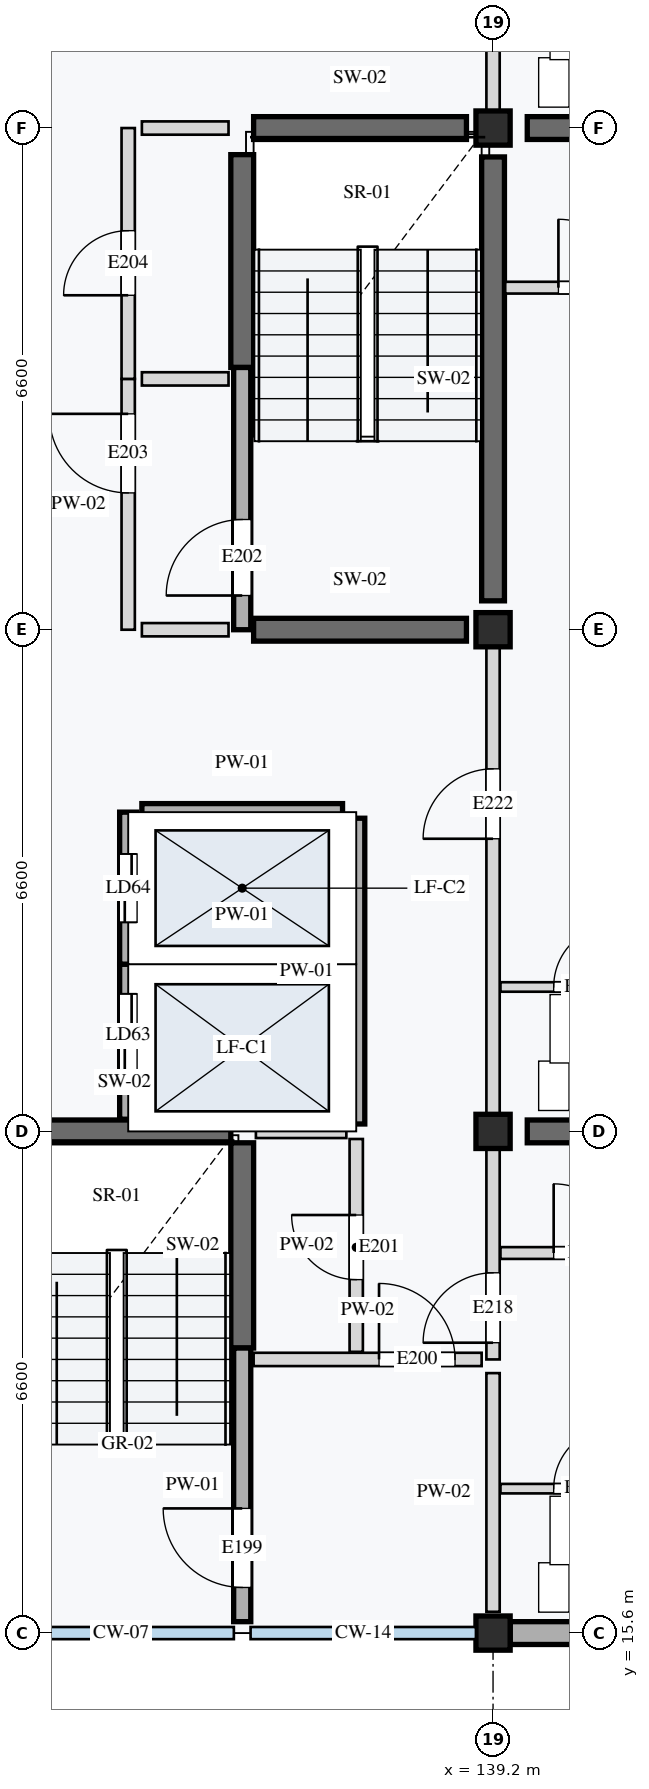
"""IFC4 building model, lengths in metres.
Left out: names, types, materials, properties, quantities, classifications, styles, units other than length and angle.
Written with IfcOpenShell. Run it as: python <this file> out.ifc"""

import sys

from ifc_helpers import new_model, si_unit, direction, frame, frame_2d, origin, origin_2d, place, context, subcontext, project, spatial, rectangle, extrude, element, fill, save


model = new_model("IFC4")
c1 = context("Model", 3, precision=1e-05, world=origin(), true_north=direction((0.0, 1.0)))
c2 = subcontext(c1, "Body", "Model", "MODEL_VIEW")
j1 = project(units=[si_unit("LENGTHUNIT", "METRE"), si_unit("PLANEANGLEUNIT", "RADIAN")], contexts=[c1])
p1 = place(None, origin())
s1 = spatial("IfcSite", under=j1, at=p1, CompositionType="ELEMENT")
p2 = place(p1, origin())
s2 = spatial("IfcBuilding", under=s1, at=p2, CompositionType="ELEMENT")
p3 = place(p2, frame((0.0, 0.0, 14.8)))
s3 = spatial("IfcBuildingStorey", under=s2, at=p3, CompositionType="ELEMENT", Elevation=14.8)
for number, where, z_axis, x_axis in (
    (1, (139.2, 15.6, 0.0), (0.0, 0.0, 1.0), (1.0, 0.0, 0.0)),
    (2, (139.2, 22.2, 0.0), (0.0, 0.0, 1.0), (1.0, 0.0, 0.0)),
    (3, (139.2, 28.8, 0.0), (0.0, 0.0, 1.0), (1.0, 0.0, 0.0)),
    (4, (139.2, 35.4, 0.0), (0.0, 0.0, 1.0), (1.0, 0.0, 0.0)),
):
    element("IfcColumn", number, at=place(p3, frame(where, z_axis=z_axis, x_axis=x_axis)), inside=s3, PredefinedType="COLUMN", context=c2, shape_type="SweptSolid", body=[
        extrude(rectangle(XDim=0.45, YDim=0.45, at=origin_2d()), origin(), (0.0, 0.0, 1.0), 3.2),
    ])
p4 = place(p3, frame((135.9, 19.35, 0.0), z_axis=(0.0, 0.0, 1.0), x_axis=(0.0, 1.0, 0.0)))
e5 = element("IfcWall", 5, at=p4, inside=s3, PredefinedType="SHEAR", context=c2, shape_type="SweptSolid", body=[
    extrude(rectangle(XDim=2.7, YDim=0.3, at=frame_2d((1.35, 0.0))), origin(), (0.0, 0.0, 1.0), 2.96),
])
p5 = place(p3, frame((132.95, 22.2, 0.0), z_axis=(0.0, 0.0, 1.0), x_axis=(1.0, 0.0, 0.0)))
e6 = element("IfcWall", 6, at=p5, inside=s3, PredefinedType="SHEAR", context=c2, shape_type="SweptSolid", body=[
    extrude(rectangle(XDim=2.8, YDim=0.3, at=frame_2d((1.4, 0.0))), origin(), (0.0, 0.0, 1.0), 2.96),
])
p6 = place(p3, frame((139.2, 29.18, 0.0), z_axis=(0.0, 0.0, 1.0), x_axis=(0.0, 1.0, 0.0)))
e7 = element("IfcWall", 7, at=p6, inside=s3, PredefinedType="SHEAR", context=c2, shape_type="SweptSolid", body=[
    extrude(rectangle(XDim=5.84, YDim=0.3, at=frame_2d((2.92, 0.0))), origin(), (0.0, 0.0, 1.0), 2.96),
])
for number, where, z_axis, x_axis in (
    (8, (135.9, 32.25, 0.0), (0.0, 0.0, 1.0), (0.0, 1.0, 0.0)),
    (9, (136.05, 28.8, 0.0), (0.0, 0.0, 1.0), (1.0, 0.0, 0.0)),
    (10, (136.05, 35.4, 0.0), (0.0, 0.0, 1.0), (1.0, 0.0, 0.0)),
):
    element("IfcWall", number, at=place(p3, frame(where, z_axis=z_axis, x_axis=x_axis)), inside=s3, PredefinedType="SHEAR", context=c2, shape_type="SweptSolid", body=[
        extrude(rectangle(XDim=2.8, YDim=0.3, at=frame_2d((1.4, 0.0))), origin(), (0.0, 0.0, 1.0), 2.96),
    ])
for number, where, z_axis, x_axis in (
    (11, (139.65, 22.2, 0.0), (0.0, 0.0, 1.0), (1.0, 0.0, 0.0)),
    (12, (139.65, 35.4, 0.0), (0.0, 0.0, 1.0), (1.0, 0.0, 0.0)),
):
    element("IfcWall", number, at=place(p3, frame(where, z_axis=z_axis, x_axis=x_axis)), inside=s3, PredefinedType="SHEAR", context=c2, shape_type="SweptSolid", body=[
        extrude(rectangle(XDim=5.7, YDim=0.3, at=frame_2d((2.85, 0.0))), origin(), (0.0, 0.0, 1.0), 2.96),
    ])
p7 = place(p3, frame((139.425, 15.6, 0.0), z_axis=(0.0, 0.0, 1.0), x_axis=(1.0, 0.0, 0.0)))
e13 = element("IfcWall", 13, at=p7, inside=s3, PredefinedType="STANDARD", context=c2, shape_type="SweptSolid", body=[
    extrude(rectangle(XDim=6.15, YDim=0.3, at=frame_2d((3.075, 0.0))), origin(), (0.0, 0.0, 1.0), 2.65),
])
p8 = place(p3, frame((135.9, 15.75, 0.0), z_axis=(0.0, 0.0, 1.0), x_axis=(0.0, 1.0, 0.0)))
e14 = element("IfcWall", 14, at=p8, inside=s3, PredefinedType="STANDARD", context=c2, shape_type="SweptSolid", body=[
    extrude(rectangle(XDim=3.6, YDim=0.225, at=frame_2d((1.8, 0.0))), origin(), (0.0, 0.0, 1.0), 2.96),
])
p9 = place(p8, frame((0.45, 0.0, 0.0)))
e15 = element("IfcOpeningElement", 15, at=p9, cuts=e14, PredefinedType="OPENING", context=c2, shape_type="SweptSolid", body=[
    extrude(rectangle(XDim=1.04, YDim=2.12, at=frame_2d((0.52, 1.06))), frame((0.0, 0.123, 0.0), z_axis=(0.0, -1.0, 0.0), x_axis=(1.0, 0.0, 0.0)), (0.0, 0.0, 1.0), 0.245),
])
p10 = place(p3, frame((136.05, 19.2, 0.0), z_axis=(0.0, 0.0, 1.0), x_axis=(1.0, 0.0, 0.0)))
e16 = element("IfcWall", 16, at=p10, inside=s3, PredefinedType="PARTITIONING", context=c2, shape_type="SweptSolid", body=[
    extrude(rectangle(XDim=3.0, YDim=0.175, at=frame_2d((1.5, 0.0))), origin(), (0.0, 0.0, 1.0), 2.96),
])
p11 = place(p10, frame((1.65, 0.0, 0.0)))
e17 = element("IfcOpeningElement", 17, at=p11, cuts=e16, PredefinedType="OPENING", context=c2, shape_type="SweptSolid", body=[
    extrude(rectangle(XDim=1.0, YDim=2.1, at=frame_2d((0.5, 1.05))), frame((0.0, 0.097, 0.0), z_axis=(0.0, -1.0, 0.0), x_axis=(1.0, 0.0, 0.0)), (0.0, 0.0, 1.0), 0.195),
])
p12 = place(p3, frame((137.4, 19.3, 0.0), z_axis=(0.0, 0.0, 1.0), x_axis=(0.0, 1.0, 0.0)))
e18 = element("IfcWall", 18, at=p12, inside=s3, PredefinedType="PARTITIONING", context=c2, shape_type="SweptSolid", body=[
    extrude(rectangle(XDim=2.8, YDim=0.175, at=frame_2d((1.4, 0.0))), origin(), (0.0, 0.0, 1.0), 2.96),
])
p13 = place(p12, frame((0.95, 0.0, 0.0)))
e19 = element("IfcOpeningElement", 19, at=p13, cuts=e18, PredefinedType="OPENING", context=c2, shape_type="SweptSolid", body=[
    extrude(rectangle(XDim=0.85, YDim=2.0, at=frame_2d((0.425, 1.0))), frame((0.0, 0.097, 0.0), z_axis=(0.0, -1.0, 0.0), x_axis=(1.0, 0.0, 0.0)), (0.0, 0.0, 1.0), 0.195),
])
p14 = place(p3, frame((136.08, 22.2, 0.0), z_axis=(0.0, 0.0, 1.0), x_axis=(1.0, 0.0, 0.0)))
e20 = element("IfcWall", 20, at=p14, inside=s3, PredefinedType="PARTITIONING", context=c2, shape_type="SweptSolid", body=[
    extrude(rectangle(XDim=1.19, YDim=0.175, at=frame_2d((0.595, 0.0))), origin(), (0.0, 0.0, 1.0), 2.96),
])
p15 = place(p3, frame((134.4, 22.36, 0.0), z_axis=(0.0, 0.0, 1.0), x_axis=(0.0, 1.0, 0.0)))
e21 = element("IfcWall", 21, at=p15, inside=s3, PredefinedType="STANDARD", context=c2, shape_type="SweptSolid", body=[
    extrude(rectangle(XDim=2.04, YDim=0.225, at=frame_2d((1.02, 0.0))), origin(), (0.0, 0.0, 1.0), 2.96),
])
p16 = place(p15, frame((0.55, 0.0, 0.0)))
e22 = element("IfcOpeningElement", 22, at=p16, cuts=e21, PredefinedType="OPENING", context=c2, shape_type="SweptSolid", body=[
    extrude(rectangle(XDim=1.1, YDim=2.1, at=frame_2d((0.55, 1.05))), frame((0.0, 0.123, 0.0), z_axis=(0.0, -1.0, 0.0), x_axis=(1.0, 0.0, 0.0)), (0.0, 0.0, 1.0), 0.245),
])
p17 = place(p3, frame((134.4, 24.4, 0.0), z_axis=(0.0, 0.0, 1.0), x_axis=(0.0, 1.0, 0.0)))
e23 = element("IfcWall", 23, at=p17, inside=s3, PredefinedType="STANDARD", context=c2, shape_type="SweptSolid", body=[
    extrude(rectangle(XDim=2.0, YDim=0.225, at=frame_2d((1.0, 0.0))), origin(), (0.0, 0.0, 1.0), 2.96),
])
p18 = place(p17, frame((0.55, 0.0, 0.0)))
e24 = element("IfcOpeningElement", 24, at=p18, cuts=e23, PredefinedType="OPENING", context=c2, shape_type="SweptSolid", body=[
    extrude(rectangle(XDim=0.9, YDim=2.1, at=frame_2d((0.45, 1.05))), frame((0.0, 0.123, 0.0), z_axis=(0.0, -1.0, 0.0), x_axis=(1.0, 0.0, 0.0)), (0.0, 0.0, 1.0), 0.245),
])
p19 = place(p3, frame((137.4, 22.298, 0.0), z_axis=(0.0, 0.0, 1.0), x_axis=(0.0, 1.0, 0.0)))
e25 = element("IfcWall", 25, at=p19, inside=s3, PredefinedType="STANDARD", context=c2, shape_type="SweptSolid", body=[
    extrude(rectangle(XDim=4.022, YDim=0.225, at=frame_2d((2.011, 0.0))), origin(), (0.0, 0.0, 1.0), 2.96),
])
for number, where, z_axis, x_axis in (
    (26, (134.58, 24.4, 0.0), (0.0, 0.0, 1.0), (1.0, 0.0, 0.0)),
    (27, (134.58, 26.4, 0.0), (0.0, 0.0, 1.0), (1.0, 0.0, 0.0)),
):
    element("IfcWall", number, at=place(p3, frame(where, z_axis=z_axis, x_axis=x_axis)), inside=s3, PredefinedType="STANDARD", context=c2, shape_type="SweptSolid", body=[
        extrude(rectangle(XDim=2.64, YDim=0.225, at=frame_2d((1.32, 0.0))), origin(), (0.0, 0.0, 1.0), 2.96),
    ])
p20 = place(p3, frame((135.9, 28.8, 0.0), z_axis=(0.0, 0.0, 1.0), x_axis=(0.0, 1.0, 0.0)))
e28 = element("IfcWall", 28, at=p20, inside=s3, PredefinedType="STANDARD", context=c2, shape_type="SweptSolid", body=[
    extrude(rectangle(XDim=3.45, YDim=0.225, at=frame_2d((1.725, 0.0))), origin(), (0.0, 0.0, 1.0), 2.96),
])
p21 = place(p20, frame((0.45, 0.0, 0.0)))
e29 = element("IfcOpeningElement", 29, at=p21, cuts=e28, PredefinedType="OPENING", context=c2, shape_type="SweptSolid", body=[
    extrude(rectangle(XDim=1.0, YDim=2.16, at=frame_2d((0.5, 1.08))), frame((0.0, 0.123, 0.0), z_axis=(0.0, -1.0, 0.0), x_axis=(1.0, 0.0, 0.0)), (0.0, 0.0, 1.0), 0.245),
])
p22 = place(p3, frame((134.4, 28.8, 0.0), z_axis=(0.0, 0.0, 1.0), x_axis=(0.0, 1.0, 0.0)))
e30 = element("IfcWall", 30, at=p22, inside=s3, PredefinedType="PARTITIONING", context=c2, shape_type="SweptSolid", body=[
    extrude(rectangle(XDim=3.3, YDim=0.175, at=frame_2d((1.65, 0.0))), origin(), (0.0, 0.0, 1.0), 2.96),
])
p23 = place(p22, frame((1.8, 0.0, 0.0)))
e31 = element("IfcOpeningElement", 31, at=p23, cuts=e30, PredefinedType="OPENING", context=c2, shape_type="SweptSolid", body=[
    extrude(rectangle(XDim=1.04, YDim=2.12, at=frame_2d((0.52, 1.06))), frame((0.0, 0.097, 0.0), z_axis=(0.0, -1.0, 0.0), x_axis=(1.0, 0.0, 0.0)), (0.0, 0.0, 1.0), 0.195),
])
p24 = place(p3, frame((134.4, 32.1, 0.0), z_axis=(0.0, 0.0, 1.0), x_axis=(0.0, 1.0, 0.0)))
e32 = element("IfcWall", 32, at=p24, inside=s3, PredefinedType="PARTITIONING", context=c2, shape_type="SweptSolid", body=[
    extrude(rectangle(XDim=3.3, YDim=0.175, at=frame_2d((1.65, 0.0))), origin(), (0.0, 0.0, 1.0), 2.96),
])
p25 = place(p24, frame((1.1, 0.0, 0.0)))
e33 = element("IfcOpeningElement", 33, at=p25, cuts=e32, PredefinedType="OPENING", context=c2, shape_type="SweptSolid", body=[
    extrude(rectangle(XDim=0.85, YDim=2.0, at=frame_2d((0.425, 1.0))), frame((0.0, 0.097, 0.0), z_axis=(0.0, -1.0, 0.0), x_axis=(1.0, 0.0, 0.0)), (0.0, 0.0, 1.0), 0.195),
])
for number, where, z_axis, x_axis in (
    (34, (134.58, 28.8, 0.0), (0.0, 0.0, 1.0), (1.0, 0.0, 0.0)),
    (35, (134.58, 32.1, 0.0), (0.0, 0.0, 1.0), (1.0, 0.0, 0.0)),
    (36, (134.58, 35.4, 0.0), (0.0, 0.0, 1.0), (1.0, 0.0, 0.0)),
):
    element("IfcWall", number, at=place(p3, frame(where, z_axis=z_axis, x_axis=x_axis)), inside=s3, PredefinedType="PARTITIONING", context=c2, shape_type="SweptSolid", body=[
        extrude(rectangle(XDim=1.14, YDim=0.175, at=frame_2d((0.57, 0.0))), origin(), (0.0, 0.0, 1.0), 2.96),
    ])
p26 = place(p3, frame((139.2, 15.88, 0.0), z_axis=(0.0, 0.0, 1.0), x_axis=(0.0, 1.0, 0.0)))
e37 = element("IfcWall", 37, at=p26, inside=s3, PredefinedType="PARTITIONING", context=c2, shape_type="SweptSolid", body=[
    extrude(rectangle(XDim=3.14, YDim=0.175, at=frame_2d((1.57, 0.0))), origin(), (0.0, 0.0, 1.0), 2.7),
])
p27 = place(p3, frame((139.2, 19.2, 0.0), z_axis=(0.0, 0.0, 1.0), x_axis=(0.0, 1.0, 0.0)))
e38 = element("IfcWall", 38, at=p27, inside=s3, PredefinedType="PARTITIONING", context=c2, shape_type="SweptSolid", body=[
    extrude(rectangle(XDim=3.0, YDim=0.175, at=frame_2d((1.5, 0.0))), origin(), (0.0, 0.0, 1.0), 2.7),
])
p28 = place(p27, frame((0.22, 0.0, 0.0)))
e39 = element("IfcOpeningElement", 39, at=p28, cuts=e38, PredefinedType="OPENING", context=c2, shape_type="SweptSolid", body=[
    extrude(rectangle(XDim=0.92, YDim=2.14, at=frame_2d((0.46, 1.07))), frame((0.0, 0.097, 0.0), z_axis=(0.0, -1.0, 0.0), x_axis=(1.0, 0.0, 0.0)), (0.0, 0.0, 1.0), 0.195),
])
p29 = place(p3, frame((139.298, 17.5, 0.0), z_axis=(0.0, 0.0, 1.0), x_axis=(1.0, 0.0, 0.0)))
e40 = element("IfcWall", 40, at=p29, inside=s3, PredefinedType="PARTITIONING", context=c2, shape_type="SweptSolid", body=[
    extrude(rectangle(XDim=2.302, YDim=0.125, at=frame_2d((1.151, 0.0))), origin(), (0.0, 0.0, 1.0), 2.96),
])
p30 = place(p29, frame((0.7, 0.0, 0.0)))
e41 = element("IfcOpeningElement", 41, at=p30, cuts=e40, PredefinedType="OPENING", context=c2, shape_type="SweptSolid", body=[
    extrude(rectangle(XDim=0.82, YDim=2.05, at=frame_2d((0.41, 1.025))), frame((0.0, 0.073, 0.0), z_axis=(0.0, -1.0, 0.0), x_axis=(1.0, 0.0, 0.0)), (0.0, 0.0, 1.0), 0.145),
])
p31 = place(p3, frame((139.298, 20.6, 0.0), z_axis=(0.0, 0.0, 1.0), x_axis=(1.0, 0.0, 0.0)))
e42 = element("IfcWall", 42, at=p31, inside=s3, PredefinedType="PARTITIONING", context=c2, shape_type="SweptSolid", body=[
    extrude(rectangle(XDim=2.302, YDim=0.155, at=frame_2d((1.151, 0.0))), origin(), (0.0, 0.0, 1.0), 2.96),
])
p32 = place(p31, frame((0.7, 0.0, 0.0)))
e43 = element("IfcOpeningElement", 43, at=p32, cuts=e42, PredefinedType="OPENING", context=c2, shape_type="SweptSolid", body=[
    extrude(rectangle(XDim=0.91, YDim=2.14, at=frame_2d((0.455, 1.07))), frame((0.0, 0.087, 0.0), z_axis=(0.0, -1.0, 0.0), x_axis=(1.0, 0.0, 0.0)), (0.0, 0.0, 1.0), 0.175),
])
p33 = place(p3, frame((139.2, 22.2, 0.0), z_axis=(0.0, 0.0, 1.0), x_axis=(0.0, 1.0, 0.0)))
e44 = element("IfcWall", 44, at=p33, inside=s3, PredefinedType="PARTITIONING", context=c2, shape_type="SweptSolid", body=[
    extrude(rectangle(XDim=6.6, YDim=0.175, at=frame_2d((3.3, 0.0))), origin(), (0.0, 0.0, 1.0), 2.7),
])
p34 = place(p33, frame((3.85, 0.0, 0.0)))
e45 = element("IfcOpeningElement", 45, at=p34, cuts=e44, PredefinedType="OPENING", context=c2, shape_type="SweptSolid", body=[
    extrude(rectangle(XDim=0.92, YDim=2.14, at=frame_2d((0.46, 1.07))), frame((0.0, 0.097, 0.0), z_axis=(0.0, -1.0, 0.0), x_axis=(1.0, 0.0, 0.0)), (0.0, 0.0, 1.0), 0.195),
])
p35 = place(p3, frame((139.298, 24.1, 0.0), z_axis=(0.0, 0.0, 1.0), x_axis=(1.0, 0.0, 0.0)))
e46 = element("IfcWall", 46, at=p35, inside=s3, PredefinedType="PARTITIONING", context=c2, shape_type="SweptSolid", body=[
    extrude(rectangle(XDim=2.302, YDim=0.125, at=frame_2d((1.151, 0.0))), origin(), (0.0, 0.0, 1.0), 2.96),
])
p36 = place(p35, frame((0.7, 0.0, 0.0)))
e47 = element("IfcOpeningElement", 47, at=p36, cuts=e46, PredefinedType="OPENING", context=c2, shape_type="SweptSolid", body=[
    extrude(rectangle(XDim=0.82, YDim=2.05, at=frame_2d((0.41, 1.025))), frame((0.0, 0.073, 0.0), z_axis=(0.0, -1.0, 0.0), x_axis=(1.0, 0.0, 0.0)), (0.0, 0.0, 1.0), 0.145),
])
p37 = place(p3, frame((139.36, 33.3, 0.0), z_axis=(0.0, 0.0, 1.0), x_axis=(1.0, 0.0, 0.0)))
e48 = element("IfcWall", 48, at=p37, inside=s3, PredefinedType="PARTITIONING", context=c2, shape_type="SweptSolid", body=[
    extrude(rectangle(XDim=2.24, YDim=0.155, at=frame_2d((1.12, 0.0))), origin(), (0.0, 0.0, 1.0), 2.96),
])
p38 = place(p37, frame((0.7, 0.0, 0.0)))
e49 = element("IfcOpeningElement", 49, at=p38, cuts=e48, PredefinedType="OPENING", context=c2, shape_type="SweptSolid", body=[
    extrude(rectangle(XDim=0.9, YDim=2.16, at=frame_2d((0.45, 1.08))), frame((0.0, 0.087, 0.0), z_axis=(0.0, -1.0, 0.0), x_axis=(1.0, 0.0, 0.0)), (0.0, 0.0, 1.0), 0.175),
])
p39 = place(p3, frame((139.2, 35.4, 0.0), z_axis=(0.0, 0.0, 1.0), x_axis=(0.0, 1.0, 0.0)))
e50 = element("IfcWall", 50, at=p39, inside=s3, PredefinedType="PARTITIONING", context=c2, shape_type="SweptSolid", body=[
    extrude(rectangle(XDim=6.6, YDim=0.175, at=frame_2d((3.3, 0.0))), origin(), (0.0, 0.0, 1.0), 2.7),
])
p40 = place(p39, frame((2.725, 0.0, 0.0)))
e51 = element("IfcOpeningElement", 51, at=p40, cuts=e50, PredefinedType="OPENING", context=c2, shape_type="SweptSolid", body=[
    extrude(rectangle(XDim=0.95, YDim=2.1, at=frame_2d((0.475, 1.05))), frame((0.0, 0.097, 0.0), z_axis=(0.0, -1.0, 0.0), x_axis=(1.0, 0.0, 0.0)), (0.0, 0.0, 1.0), 0.195),
])
p41 = place(p9, origin())
e52 = element("IfcDoor", 52, at=p41, inside=s3, OperationType="SINGLE_SWING_RIGHT", PredefinedType="DOOR", context=c2, shape_type="SweptSolid", body=[
    extrude(rectangle(XDim=1.04, YDim=2.12, at=frame_2d((0.52, 1.06))), frame((0.0, 0.025, 0.0), z_axis=(0.0, -1.0, 0.0), x_axis=(1.0, 0.0, 0.0)), (0.0, 0.0, 1.0), 0.05),
])
fill(e15, e52)
p42 = place(p11, origin())
e53 = element("IfcDoor", 53, at=p42, inside=s3, OperationType="SINGLE_SWING_LEFT", PredefinedType="DOOR", context=c2, shape_type="SweptSolid", body=[
    extrude(rectangle(XDim=1.0, YDim=2.1, at=frame_2d((0.5, 1.05))), frame((0.0, 0.025, 0.0), z_axis=(0.0, -1.0, 0.0), x_axis=(1.0, 0.0, 0.0)), (0.0, 0.0, 1.0), 0.05),
])
fill(e17, e53)
p43 = place(p13, origin())
e54 = element("IfcDoor", 54, at=p43, inside=s3, OperationType="SINGLE_SWING_RIGHT", PredefinedType="DOOR", context=c2, shape_type="SweptSolid", body=[
    extrude(rectangle(XDim=0.85, YDim=2.0, at=frame_2d((0.425, 1.0))), frame((0.0, 0.025, 0.0), z_axis=(0.0, -1.0, 0.0), x_axis=(1.0, 0.0, 0.0)), (0.0, 0.0, 1.0), 0.05),
])
fill(e19, e54)
p44 = place(p16, origin())
e55 = element("IfcDoor", 55, at=p44, inside=s3, OperationType="DOUBLE_DOOR_SLIDING", PredefinedType="DOOR", context=c2, shape_type="SweptSolid", body=[
    extrude(rectangle(XDim=1.1, YDim=2.1, at=frame_2d((0.55, 1.05))), frame((0.0, 0.025, 0.0), z_axis=(0.0, -1.0, 0.0), x_axis=(1.0, 0.0, 0.0)), (0.0, 0.0, 1.0), 0.05),
])
fill(e22, e55)
p45 = place(p18, origin())
e56 = element("IfcDoor", 56, at=p45, inside=s3, OperationType="DOUBLE_DOOR_SLIDING", PredefinedType="DOOR", context=c2, shape_type="SweptSolid", body=[
    extrude(rectangle(XDim=0.9, YDim=2.1, at=frame_2d((0.45, 1.05))), frame((0.0, 0.025, 0.0), z_axis=(0.0, -1.0, 0.0), x_axis=(1.0, 0.0, 0.0)), (0.0, 0.0, 1.0), 0.05),
])
fill(e24, e56)
p46 = place(p21, origin())
e57 = element("IfcDoor", 57, at=p46, inside=s3, OperationType="SINGLE_SWING_LEFT", PredefinedType="DOOR", context=c2, shape_type="SweptSolid", body=[
    extrude(rectangle(XDim=1.0, YDim=2.16, at=frame_2d((0.5, 1.08))), frame((0.0, 0.025, 0.0), z_axis=(0.0, -1.0, 0.0), x_axis=(1.0, 0.0, 0.0)), (0.0, 0.0, 1.0), 0.05),
])
fill(e29, e57)
p47 = place(p23, origin())
e58 = element("IfcDoor", 58, at=p47, inside=s3, OperationType="SINGLE_SWING_RIGHT", PredefinedType="DOOR", context=c2, shape_type="SweptSolid", body=[
    extrude(rectangle(XDim=1.04, YDim=2.12, at=frame_2d((0.52, 1.06))), frame((0.0, 0.025, 0.0), z_axis=(0.0, -1.0, 0.0), x_axis=(1.0, 0.0, 0.0)), (0.0, 0.0, 1.0), 0.05),
])
fill(e31, e58)
p48 = place(p25, origin())
e59 = element("IfcDoor", 59, at=p48, inside=s3, OperationType="SINGLE_SWING_LEFT", PredefinedType="DOOR", context=c2, shape_type="SweptSolid", body=[
    extrude(rectangle(XDim=0.85, YDim=2.0, at=frame_2d((0.425, 1.0))), frame((0.0, 0.025, 0.0), z_axis=(0.0, -1.0, 0.0), x_axis=(1.0, 0.0, 0.0)), (0.0, 0.0, 1.0), 0.05),
])
fill(e33, e59)
p49 = place(p28, origin())
e60 = element("IfcDoor", 60, at=p49, inside=s3, OperationType="SINGLE_SWING_LEFT", PredefinedType="DOOR", context=c2, shape_type="SweptSolid", body=[
    extrude(rectangle(XDim=0.92, YDim=2.14, at=frame_2d((0.46, 1.07))), frame((0.0, 0.025, 0.0), z_axis=(0.0, -1.0, 0.0), x_axis=(1.0, 0.0, 0.0)), (0.0, 0.0, 1.0), 0.05),
])
fill(e39, e60)
p50 = place(p30, origin())
e61 = element("IfcDoor", 61, at=p50, inside=s3, OperationType="SINGLE_SWING_RIGHT", PredefinedType="DOOR", context=c2, shape_type="SweptSolid", body=[
    extrude(rectangle(XDim=0.82, YDim=2.05, at=frame_2d((0.41, 1.025))), frame((0.0, 0.025, 0.0), z_axis=(0.0, -1.0, 0.0), x_axis=(1.0, 0.0, 0.0)), (0.0, 0.0, 1.0), 0.05),
])
fill(e41, e61)
p51 = place(p32, origin())
e62 = element("IfcDoor", 62, at=p51, inside=s3, OperationType="SINGLE_SWING_LEFT", PredefinedType="DOOR", context=c2, shape_type="SweptSolid", body=[
    extrude(rectangle(XDim=0.91, YDim=2.14, at=frame_2d((0.455, 1.07))), frame((0.0, 0.025, 0.0), z_axis=(0.0, -1.0, 0.0), x_axis=(1.0, 0.0, 0.0)), (0.0, 0.0, 1.0), 0.05),
])
fill(e43, e62)
p52 = place(p34, origin())
e63 = element("IfcDoor", 63, at=p52, inside=s3, OperationType="SINGLE_SWING_LEFT", PredefinedType="DOOR", context=c2, shape_type="SweptSolid", body=[
    extrude(rectangle(XDim=0.92, YDim=2.14, at=frame_2d((0.46, 1.07))), frame((0.0, 0.025, 0.0), z_axis=(0.0, -1.0, 0.0), x_axis=(1.0, 0.0, 0.0)), (0.0, 0.0, 1.0), 0.05),
])
fill(e45, e63)
p53 = place(p36, origin())
e64 = element("IfcDoor", 64, at=p53, inside=s3, OperationType="SINGLE_SWING_RIGHT", PredefinedType="DOOR", context=c2, shape_type="SweptSolid", body=[
    extrude(rectangle(XDim=0.82, YDim=2.05, at=frame_2d((0.41, 1.025))), frame((0.0, 0.025, 0.0), z_axis=(0.0, -1.0, 0.0), x_axis=(1.0, 0.0, 0.0)), (0.0, 0.0, 1.0), 0.05),
])
fill(e47, e64)
p54 = place(p38, origin())
e65 = element("IfcDoor", 65, at=p54, inside=s3, OperationType="SINGLE_SWING_LEFT", PredefinedType="DOOR", context=c2, shape_type="SweptSolid", body=[
    extrude(rectangle(XDim=0.9, YDim=2.16, at=frame_2d((0.45, 1.08))), frame((0.0, 0.025, 0.0), z_axis=(0.0, -1.0, 0.0), x_axis=(1.0, 0.0, 0.0)), (0.0, 0.0, 1.0), 0.05),
])
fill(e49, e65)
save(model, sys.argv[1])
